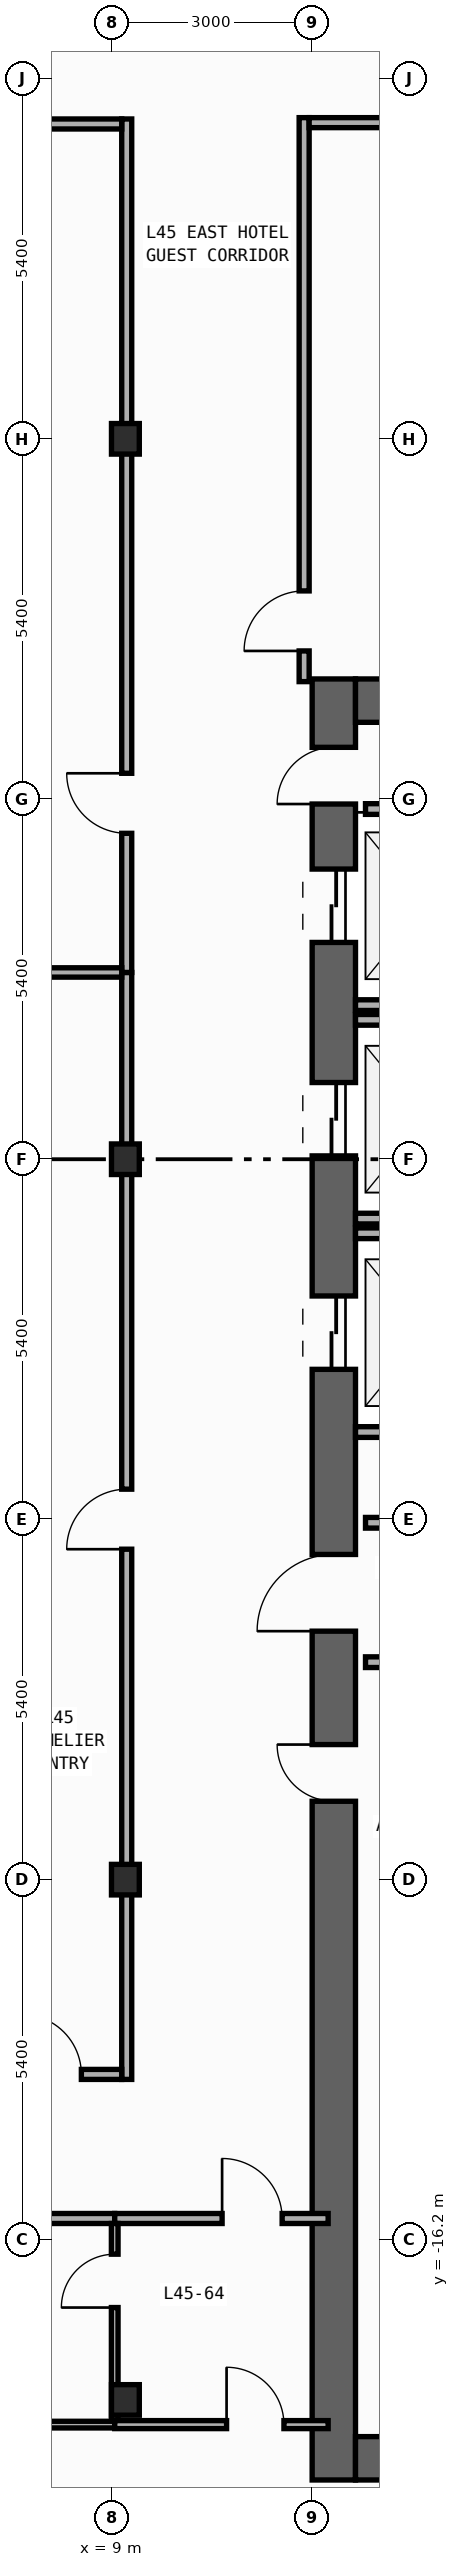
"""IFC4 building model, lengths in metres.
Left out: names, types, materials, properties, quantities, classifications, styles, units other than length and angle.
Written with IfcOpenShell. Run it as: python <this file> out.ifc"""

import sys

from ifc_helpers import new_model, si_unit, direction, frame, frame_2d, origin, origin_2d, place, context, subcontext, project, spatial, rectangle, i_section, extrude, element, fill, save


model = new_model("IFC4")
c1 = context("Model", 3, precision=1e-05, world=origin(), true_north=direction((0.0, 1.0)))
c2 = subcontext(c1, "Body", "Model", "MODEL_VIEW")
j1 = project(units=[si_unit("LENGTHUNIT", "METRE"), si_unit("PLANEANGLEUNIT", "RADIAN")], contexts=[c1])
p1 = place(None, origin())
s1 = spatial("IfcSite", under=j1, at=p1, CompositionType="ELEMENT")
p2 = place(p1, origin())
s2 = spatial("IfcBuilding", under=s1, at=p2, CompositionType="ELEMENT")
p3 = place(p2, frame((0.0, 0.0, 195.4)))
s3 = spatial("IfcBuildingStorey", under=s2, at=p3, CompositionType="ELEMENT", Elevation=195.4)
p4 = place(p3, frame((12.325, -19.8, 0.0), z_axis=(0.0, 0.0, 1.0), x_axis=(0.0, 1.0, 0.0)))
e1 = element("IfcWall", 1, at=p4, inside=s3, PredefinedType="SHEAR", context=c2, shape_type="SweptSolid", body=[
    extrude(rectangle(XDim=27.0, YDim=0.65, at=frame_2d((13.5, 0.0))), origin(), (0.0, 0.0, 1.0), 3.54),
])
p5 = place(p4, frame((23.05, 0.0, 0.0)))
e2 = element("IfcOpeningElement", 2, at=p5, cuts=e1, PredefinedType="OPENING", context=c2, shape_type="SweptSolid", body=[
    extrude(rectangle(XDim=1.1, YDim=2.2, at=frame_2d((0.55, 1.1))), frame((0.0, 0.335, 0.0), z_axis=(0.0, -1.0, 0.0), x_axis=(1.0, 0.0, 0.0)), (0.0, 0.0, 1.0), 0.67),
])
p6 = place(p4, frame((19.85, 0.0, 0.0)))
e3 = element("IfcOpeningElement", 3, at=p6, cuts=e1, PredefinedType="OPENING", context=c2, shape_type="SweptSolid", body=[
    extrude(rectangle(XDim=1.1, YDim=2.2, at=frame_2d((0.55, 1.1))), frame((0.0, 0.335, 0.0), z_axis=(0.0, -1.0, 0.0), x_axis=(1.0, 0.0, 0.0)), (0.0, 0.0, 1.0), 0.67),
])
p7 = place(p4, frame((16.65, 0.0, 0.0)))
e4 = element("IfcOpeningElement", 4, at=p7, cuts=e1, PredefinedType="OPENING", context=c2, shape_type="SweptSolid", body=[
    extrude(rectangle(XDim=1.1, YDim=2.2, at=frame_2d((0.55, 1.1))), frame((0.0, 0.335, 0.0), z_axis=(0.0, -1.0, 0.0), x_axis=(1.0, 0.0, 0.0)), (0.0, 0.0, 1.0), 0.67),
])
p8 = place(p4, frame((10.175, 0.0, 0.0)))
e5 = element("IfcOpeningElement", 5, at=p8, cuts=e1, PredefinedType="OPENING", context=c2, shape_type="SweptSolid", body=[
    extrude(rectangle(XDim=0.85, YDim=2.1, at=frame_2d((0.425, 1.05))), frame((0.0, 0.335, 0.0), z_axis=(0.0, -1.0, 0.0), x_axis=(1.0, 0.0, 0.0)), (0.0, 0.0, 1.0), 0.67),
])
p9 = place(p4, frame((12.725, 0.0, 0.0)))
e6 = element("IfcOpeningElement", 6, at=p9, cuts=e1, PredefinedType="OPENING", context=c2, shape_type="SweptSolid", body=[
    extrude(rectangle(XDim=1.15, YDim=2.2, at=frame_2d((0.575, 1.1))), frame((0.0, 0.335, 0.0), z_axis=(0.0, -1.0, 0.0), x_axis=(1.0, 0.0, 0.0)), (0.0, 0.0, 1.0), 0.67),
])
p10 = place(p4, frame((25.125, 0.0, 0.0)))
e7 = element("IfcOpeningElement", 7, at=p10, cuts=e1, PredefinedType="OPENING", context=c2, shape_type="SweptSolid", body=[
    extrude(rectangle(XDim=0.85, YDim=2.1, at=frame_2d((0.425, 1.05))), frame((0.0, 0.335, 0.0), z_axis=(0.0, -1.0, 0.0), x_axis=(1.0, 0.0, 0.0)), (0.0, 0.0, 1.0), 0.67),
])
for number, where, z_axis, x_axis in (
    (8, (12.65, -19.475, 0.0), (0.0, 0.0, 1.0), (1.0, 0.0, 0.0)),
    (9, (12.65, 6.875, 0.0), (0.0, 0.0, 1.0), (1.0, 0.0, 0.0)),
):
    element("IfcWall", number, at=place(p3, frame(where, z_axis=z_axis, x_axis=x_axis)), inside=s3, PredefinedType="SHEAR", context=c2, shape_type="SweptSolid", body=[
        extrude(rectangle(XDim=7.1, YDim=0.65, at=frame_2d((3.55, 0.0))), origin(), (0.0, 0.0, 1.0), 3.54),
    ])
for number, where, z_axis, x_axis in (
    (10, (9.2, -18.6, 0.0), (0.0, 0.0, 1.0), (1.0, 0.0, 0.0)),
    (11, (9.2, -10.8, 0.0), (0.0, 0.0, 1.0), (1.0, 0.0, 0.0)),
    (12, (9.2, 0.0, 0.0), (0.0, 0.0, 1.0), (1.0, 0.0, 0.0)),
    (13, (9.2, 10.8, 0.0), (0.0, 0.0, 1.0), (1.0, 0.0, 0.0)),
):
    element("IfcColumn", number, at=place(p3, frame(where, z_axis=z_axis, x_axis=x_axis)), inside=s3, PredefinedType="COLUMN", context=c2, shape_type="SweptSolid", body=[
        extrude(i_section(OverallWidth=0.417, OverallDepth=0.458, WebThickness=0.03, FlangeThickness=0.05, FilletRadius=0.022, at=origin_2d()), origin(), (0.0, 0.0, 1.0), 3.8),
    ])
for number, where, z_axis, x_axis in (
    (14, (12.65, 2.31, 0.0), (0.0, 0.0, 1.0), (1.0, 0.0, 0.0)),
    (15, (12.65, -0.89, 0.0), (0.0, 0.0, 1.0), (1.0, 0.0, 0.0)),
    (16, (12.65, 2.09, 0.0), (0.0, 0.0, 1.0), (1.0, 0.0, 0.0)),
    (17, (12.65, -4.09, 0.0), (0.0, 0.0, 1.0), (1.0, 0.0, 0.0)),
    (18, (12.65, -1.11, 0.0), (0.0, 0.0, 1.0), (1.0, 0.0, 0.0)),
):
    element("IfcWall", number, at=place(p3, frame(where, z_axis=z_axis, x_axis=x_axis)), inside=s3, PredefinedType="STANDARD", context=c2, shape_type="SweptSolid", body=[
        extrude(rectangle(XDim=2.34, YDim=0.16, at=frame_2d((1.17, 0.0))), origin(), (0.0, 0.0, 1.0), 3.54),
    ])
for number, where, z_axis, x_axis in (
    (19, (12.8, -5.45, 0.0), (0.0, 0.0, 1.0), (1.0, 0.0, 0.0)),
    (20, (12.8, -7.54, 0.0), (0.0, 0.0, 1.0), (1.0, 0.0, 0.0)),
    (21, (12.8, 5.25, 0.0), (0.0, 0.0, 1.0), (1.0, 0.0, 0.0)),
):
    element("IfcWall", number, at=place(p3, frame(where, z_axis=z_axis, x_axis=x_axis)), inside=s3, PredefinedType="STANDARD", context=c2, shape_type="SweptSolid", body=[
        extrude(rectangle(XDim=2.6, YDim=0.16, at=frame_2d((1.3, 0.0))), origin(), (0.0, 0.0, 1.0), 3.54),
    ])
p11 = place(p3, frame((9.22, -13.795, 0.0), z_axis=(0.0, 0.0, 1.0), x_axis=(0.0, 1.0, 0.0)))
e22 = element("IfcWall", 22, at=p11, inside=s3, PredefinedType="PARTITIONING", context=c2, shape_type="SweptSolid", body=[
    extrude(rectangle(XDim=16.595, YDim=0.15, at=frame_2d((8.297, 0.0))), origin(), (0.0, 0.0, 1.0), 2.952),
])
p12 = place(p11, frame((7.949, 0.0, 0.0)))
e23 = element("IfcOpeningElement", 23, at=p12, cuts=e22, PredefinedType="OPENING", context=c2, shape_type="SweptSolid", body=[
    extrude(rectangle(XDim=0.9, YDim=2.15, at=frame_2d((0.45, 1.075))), frame((0.0, 0.085, 0.0), z_axis=(0.0, -1.0, 0.0), x_axis=(1.0, 0.0, 0.0)), (0.0, 0.0, 1.0), 0.17),
])
p13 = place(p3, frame((9.22, 2.8, 0.0), z_axis=(0.0, 0.0, 1.0), x_axis=(0.0, 1.0, 0.0)))
e24 = element("IfcWall", 24, at=p13, inside=s3, PredefinedType="PARTITIONING", context=c2, shape_type="SweptSolid", body=[
    extrude(rectangle(XDim=12.795, YDim=0.15, at=frame_2d((6.397, 0.0))), origin(), (0.0, 0.0, 1.0), 2.952),
])
p14 = place(p13, frame((2.086, 0.0, 0.0)))
e25 = element("IfcOpeningElement", 25, at=p14, cuts=e24, PredefinedType="OPENING", context=c2, shape_type="SweptSolid", body=[
    extrude(rectangle(XDim=0.9, YDim=2.15, at=frame_2d((0.45, 1.075))), frame((0.0, 0.085, 0.0), z_axis=(0.0, -1.0, 0.0), x_axis=(1.0, 0.0, 0.0)), (0.0, 0.0, 1.0), 0.17),
])
p15 = place(p3, frame((11.88, 7.16, 0.0), z_axis=(0.0, 0.0, 1.0), x_axis=(0.0, 1.0, 0.0)))
e26 = element("IfcWall", 26, at=p15, inside=s3, PredefinedType="PARTITIONING", context=c2, shape_type="SweptSolid", body=[
    extrude(rectangle(XDim=8.455, YDim=0.15, at=frame_2d((4.228, 0.0))), origin(), (0.0, 0.0, 1.0), 3.54),
])
p16 = place(p15, frame((0.46, 0.0, 0.0)))
e27 = element("IfcOpeningElement", 27, at=p16, cuts=e26, PredefinedType="OPENING", context=c2, shape_type="SweptSolid", body=[
    extrude(rectangle(XDim=0.9, YDim=2.15, at=frame_2d((0.45, 1.075))), frame((0.0, 0.085, 0.0), z_axis=(0.0, -1.0, 0.0), x_axis=(1.0, 0.0, 0.0)), (0.0, 0.0, 1.0), 0.17),
])
p17 = place(p3, frame((-0.32, 15.52, 0.0), z_axis=(0.0, 0.0, 1.0), x_axis=(1.0, 0.0, 0.0)))
e28 = element("IfcWall", 28, at=p17, inside=s3, PredefinedType="PARTITIONING", context=c2, shape_type="SweptSolid", body=[
    extrude(rectangle(XDim=9.465, YDim=0.15, at=frame_2d((4.732, 0.0))), origin(), (0.0, 0.0, 1.0), 3.54),
])
p18 = place(p17, frame((6.898, 0.0, 0.0)))
e29 = element("IfcOpeningElement", 29, at=p18, cuts=e28, PredefinedType="OPENING", context=c2, shape_type="SweptSolid", body=[
    extrude(rectangle(XDim=0.9, YDim=2.15, at=frame_2d((0.45, 1.075))), frame((0.0, 0.085, 0.0), z_axis=(0.0, -1.0, 0.0), x_axis=(1.0, 0.0, 0.0)), (0.0, 0.0, 1.0), 0.17),
])
p19 = place(p3, frame((11.955, 15.54, 0.0), z_axis=(0.0, 0.0, 1.0), x_axis=(1.0, 0.0, 0.0)))
e30 = element("IfcWall", 30, at=p19, inside=s3, PredefinedType="PARTITIONING", context=c2, shape_type="SweptSolid", body=[
    extrude(rectangle(XDim=10.5, YDim=0.15, at=frame_2d((5.25, 0.0))), origin(), (0.0, 0.0, 1.0), 3.54),
])
p20 = place(p19, frame((4.901, 0.0, 0.0)))
e31 = element("IfcOpeningElement", 31, at=p20, cuts=e30, PredefinedType="OPENING", context=c2, shape_type="SweptSolid", body=[
    extrude(rectangle(XDim=0.9, YDim=2.15, at=frame_2d((0.45, 1.075))), frame((0.0, 0.085, 0.0), z_axis=(0.0, -1.0, 0.0), x_axis=(1.0, 0.0, 0.0)), (0.0, 0.0, 1.0), 0.17),
])
p21 = place(p3, frame((7.18, -13.72, 0.0), z_axis=(0.0, 0.0, 1.0), x_axis=(1.0, 0.0, 0.0)))
e32 = element("IfcWall", 32, at=p21, inside=s3, PredefinedType="PARTITIONING", context=c2, shape_type="SweptSolid", body=[
    extrude(rectangle(XDim=1.965, YDim=0.15, at=frame_2d((0.982, 0.0))), origin(), (0.0, 0.0, 1.0), 3.54),
])
p22 = place(p21, frame((0.46, 0.0, 0.0)))
e33 = element("IfcOpeningElement", 33, at=p22, cuts=e32, PredefinedType="OPENING", context=c2, shape_type="SweptSolid", body=[
    extrude(rectangle(XDim=0.9, YDim=2.15, at=frame_2d((0.45, 1.075))), frame((0.0, 0.085, 0.0), z_axis=(0.0, -1.0, 0.0), x_axis=(1.0, 0.0, 0.0)), (0.0, 0.0, 1.0), 0.17),
])
p23 = place(p3, frame((5.5, -15.88, 0.0), z_axis=(0.0, 0.0, 1.0), x_axis=(1.0, 0.0, 0.0)))
e34 = element("IfcWall", 34, at=p23, inside=s3, PredefinedType="PARTITIONING", context=c2, shape_type="SweptSolid", body=[
    extrude(rectangle(XDim=3.54, YDim=0.15, at=frame_2d((1.77, 0.0))), origin(), (0.0, 0.0, 1.0), 3.54),
])
p24 = place(p3, frame((9.04, -15.88, 0.0), z_axis=(0.0, 0.0, 1.0), x_axis=(1.0, 0.0, 0.0)))
e35 = element("IfcWall", 35, at=p24, inside=s3, PredefinedType="PARTITIONING", context=c2, shape_type="SweptSolid", body=[
    extrude(rectangle(XDim=3.2, YDim=0.15, at=frame_2d((1.6, 0.0))), origin(), (0.0, 0.0, 1.0), 3.54),
])
p25 = place(p24, frame((1.61, 0.0, 0.0)))
e36 = element("IfcOpeningElement", 36, at=p25, cuts=e35, PredefinedType="OPENING", context=c2, shape_type="SweptSolid", body=[
    extrude(rectangle(XDim=0.9, YDim=2.15, at=frame_2d((0.45, 1.075))), frame((0.0, 0.085, 0.0), z_axis=(0.0, -1.0, 0.0), x_axis=(1.0, 0.0, 0.0)), (0.0, 0.0, 1.0), 0.17),
])
p26 = place(p3, frame((7.02, 2.8, 0.0), z_axis=(0.0, 0.0, 1.0), x_axis=(1.0, 0.0, 0.0)))
e37 = element("IfcWall", 37, at=p26, inside=s3, PredefinedType="PARTITIONING", context=c2, shape_type="SweptSolid", body=[
    extrude(rectangle(XDim=2.125, YDim=0.14, at=frame_2d((1.062, 0.0))), origin(), (0.0, 0.0, 1.0), 3.54),
])
p27 = place(p3, frame((9.04, -18.92, 0.0), z_axis=(0.0, 0.0, 1.0), x_axis=(0.0, 1.0, 0.0)))
e38 = element("IfcWall", 38, at=p27, inside=s3, PredefinedType="PARTITIONING", context=c2, shape_type="SweptSolid", body=[
    extrude(rectangle(XDim=2.965, YDim=0.1, at=frame_2d((1.482, 0.0))), origin(), (0.0, 0.0, 1.0), 2.952),
])
p28 = place(p27, frame((1.705, 0.0, 0.0)))
e39 = element("IfcOpeningElement", 39, at=p28, cuts=e38, PredefinedType="OPENING", context=c2, shape_type="SweptSolid", body=[
    extrude(rectangle(XDim=0.8, YDim=2.1, at=frame_2d((0.4, 1.05))), frame((0.0, 0.06, 0.0), z_axis=(0.0, -1.0, 0.0), x_axis=(1.0, 0.0, 0.0)), (0.0, 0.0, 1.0), 0.12),
])
p29 = place(p3, frame((5.5, -18.97, 0.0), z_axis=(0.0, 0.0, 1.0), x_axis=(1.0, 0.0, 0.0)))
e40 = element("IfcWall", 40, at=p29, inside=s3, PredefinedType="PARTITIONING", context=c2, shape_type="SweptSolid", body=[
    extrude(rectangle(XDim=3.54, YDim=0.1, at=frame_2d((1.77, 0.0))), origin(), (0.0, 0.0, 1.0), 3.54),
])
p30 = place(p29, frame((1.067, 0.0, 0.0)))
e41 = element("IfcOpeningElement", 41, at=p30, cuts=e40, PredefinedType="OPENING", context=c2, shape_type="SweptSolid", body=[
    extrude(rectangle(XDim=0.8, YDim=2.1, at=frame_2d((0.4, 1.05))), frame((0.0, 0.06, 0.0), z_axis=(0.0, -1.0, 0.0), x_axis=(1.0, 0.0, 0.0)), (0.0, 0.0, 1.0), 0.12),
])
p31 = place(p3, frame((9.04, -18.97, 0.0), z_axis=(0.0, 0.0, 1.0), x_axis=(1.0, 0.0, 0.0)))
e42 = element("IfcWall", 42, at=p31, inside=s3, PredefinedType="PARTITIONING", context=c2, shape_type="SweptSolid", body=[
    extrude(rectangle(XDim=3.2, YDim=0.12, at=frame_2d((1.6, 0.0))), origin(), (0.0, 0.0, 1.0), 3.54),
])
p32 = place(p31, frame((1.677, 0.0, 0.0)))
e43 = element("IfcOpeningElement", 43, at=p32, cuts=e42, PredefinedType="OPENING", context=c2, shape_type="SweptSolid", body=[
    extrude(rectangle(XDim=0.86, YDim=2.15, at=frame_2d((0.43, 1.075))), frame((0.0, 0.07, 0.0), z_axis=(0.0, -1.0, 0.0), x_axis=(1.0, 0.0, 0.0)), (0.0, 0.0, 1.0), 0.14),
])
p33 = place(p5, origin())
e44 = element("IfcDoor", 44, at=p33, inside=s3, OperationType="DOUBLE_DOOR_SLIDING", PredefinedType="DOOR", context=c2, shape_type="SweptSolid", body=[
    extrude(rectangle(XDim=1.1, YDim=2.2, at=frame_2d((0.55, 1.1))), frame((0.0, 0.025, 0.0), z_axis=(0.0, -1.0, 0.0), x_axis=(1.0, 0.0, 0.0)), (0.0, 0.0, 1.0), 0.05),
])
fill(e2, e44)
p34 = place(p6, origin())
e45 = element("IfcDoor", 45, at=p34, inside=s3, OperationType="DOUBLE_DOOR_SLIDING", PredefinedType="DOOR", context=c2, shape_type="SweptSolid", body=[
    extrude(rectangle(XDim=1.1, YDim=2.2, at=frame_2d((0.55, 1.1))), frame((0.0, 0.025, 0.0), z_axis=(0.0, -1.0, 0.0), x_axis=(1.0, 0.0, 0.0)), (0.0, 0.0, 1.0), 0.05),
])
fill(e3, e45)
p35 = place(p7, origin())
e46 = element("IfcDoor", 46, at=p35, inside=s3, OperationType="DOUBLE_DOOR_SLIDING", PredefinedType="DOOR", context=c2, shape_type="SweptSolid", body=[
    extrude(rectangle(XDim=1.1, YDim=2.2, at=frame_2d((0.55, 1.1))), frame((0.0, 0.025, 0.0), z_axis=(0.0, -1.0, 0.0), x_axis=(1.0, 0.0, 0.0)), (0.0, 0.0, 1.0), 0.05),
])
fill(e4, e46)
p36 = place(p8, origin())
e47 = element("IfcDoor", 47, at=p36, inside=s3, OperationType="SINGLE_SWING_RIGHT", PredefinedType="DOOR", context=c2, shape_type="SweptSolid", body=[
    extrude(rectangle(XDim=0.85, YDim=2.1, at=frame_2d((0.425, 1.05))), frame((0.0, 0.025, 0.0), z_axis=(0.0, -1.0, 0.0), x_axis=(1.0, 0.0, 0.0)), (0.0, 0.0, 1.0), 0.05),
])
fill(e5, e47)
p37 = place(p9, origin())
e48 = element("IfcDoor", 48, at=p37, inside=s3, OperationType="SINGLE_SWING_LEFT", PredefinedType="DOOR", context=c2, shape_type="SweptSolid", body=[
    extrude(rectangle(XDim=1.15, YDim=2.2, at=frame_2d((0.575, 1.1))), frame((0.0, 0.025, 0.0), z_axis=(0.0, -1.0, 0.0), x_axis=(1.0, 0.0, 0.0)), (0.0, 0.0, 1.0), 0.05),
])
fill(e6, e48)
p38 = place(p10, origin())
e49 = element("IfcDoor", 49, at=p38, inside=s3, OperationType="SINGLE_SWING_LEFT", PredefinedType="DOOR", context=c2, shape_type="SweptSolid", body=[
    extrude(rectangle(XDim=0.85, YDim=2.1, at=frame_2d((0.425, 1.05))), frame((0.0, 0.025, 0.0), z_axis=(0.0, -1.0, 0.0), x_axis=(1.0, 0.0, 0.0)), (0.0, 0.0, 1.0), 0.05),
])
fill(e7, e49)
p39 = place(p12, origin())
e50 = element("IfcDoor", 50, at=p39, inside=s3, OperationType="SINGLE_SWING_LEFT", PredefinedType="DOOR", context=c2, shape_type="SweptSolid", body=[
    extrude(rectangle(XDim=0.9, YDim=2.15, at=frame_2d((0.45, 1.075))), frame((0.0, 0.025, 0.0), z_axis=(0.0, -1.0, 0.0), x_axis=(1.0, 0.0, 0.0)), (0.0, 0.0, 1.0), 0.05),
])
fill(e23, e50)
p40 = place(p14, origin())
e51 = element("IfcDoor", 51, at=p40, inside=s3, OperationType="SINGLE_SWING_RIGHT", PredefinedType="DOOR", context=c2, shape_type="SweptSolid", body=[
    extrude(rectangle(XDim=0.9, YDim=2.15, at=frame_2d((0.45, 1.075))), frame((0.0, 0.025, 0.0), z_axis=(0.0, -1.0, 0.0), x_axis=(1.0, 0.0, 0.0)), (0.0, 0.0, 1.0), 0.05),
])
fill(e25, e51)
p41 = place(p16, origin())
e52 = element("IfcDoor", 52, at=p41, inside=s3, OperationType="SINGLE_SWING_LEFT", PredefinedType="DOOR", context=c2, shape_type="SweptSolid", body=[
    extrude(rectangle(XDim=0.9, YDim=2.15, at=frame_2d((0.45, 1.075))), frame((0.0, 0.025, 0.0), z_axis=(0.0, -1.0, 0.0), x_axis=(1.0, 0.0, 0.0)), (0.0, 0.0, 1.0), 0.05),
])
fill(e27, e52)
p42 = place(p22, origin())
e53 = element("IfcDoor", 53, at=p42, inside=s3, OperationType="SINGLE_SWING_LEFT", PredefinedType="DOOR", context=c2, shape_type="SweptSolid", body=[
    extrude(rectangle(XDim=0.9, YDim=2.15, at=frame_2d((0.45, 1.075))), frame((0.0, 0.025, 0.0), z_axis=(0.0, -1.0, 0.0), x_axis=(1.0, 0.0, 0.0)), (0.0, 0.0, 1.0), 0.05),
])
fill(e33, e53)
p43 = place(p25, origin())
e54 = element("IfcDoor", 54, at=p43, inside=s3, OperationType="SINGLE_SWING_LEFT", PredefinedType="DOOR", context=c2, shape_type="SweptSolid", body=[
    extrude(rectangle(XDim=0.9, YDim=2.15, at=frame_2d((0.45, 1.075))), frame((0.0, 0.025, 0.0), z_axis=(0.0, -1.0, 0.0), x_axis=(1.0, 0.0, 0.0)), (0.0, 0.0, 1.0), 0.05),
])
fill(e36, e54)
p44 = place(p28, origin())
e55 = element("IfcDoor", 55, at=p44, inside=s3, OperationType="SINGLE_SWING_LEFT", PredefinedType="DOOR", context=c2, shape_type="SweptSolid", body=[
    extrude(rectangle(XDim=0.8, YDim=2.1, at=frame_2d((0.4, 1.05))), frame((0.0, 0.025, 0.0), z_axis=(0.0, -1.0, 0.0), x_axis=(1.0, 0.0, 0.0)), (0.0, 0.0, 1.0), 0.05),
])
fill(e39, e55)
p45 = place(p32, origin())
e56 = element("IfcDoor", 56, at=p45, inside=s3, OperationType="SINGLE_SWING_LEFT", PredefinedType="DOOR", context=c2, shape_type="SweptSolid", body=[
    extrude(rectangle(XDim=0.86, YDim=2.15, at=frame_2d((0.43, 1.075))), frame((0.0, 0.025, 0.0), z_axis=(0.0, -1.0, 0.0), x_axis=(1.0, 0.0, 0.0)), (0.0, 0.0, 1.0), 0.05),
])
fill(e43, e56)
save(model, sys.argv[1])
